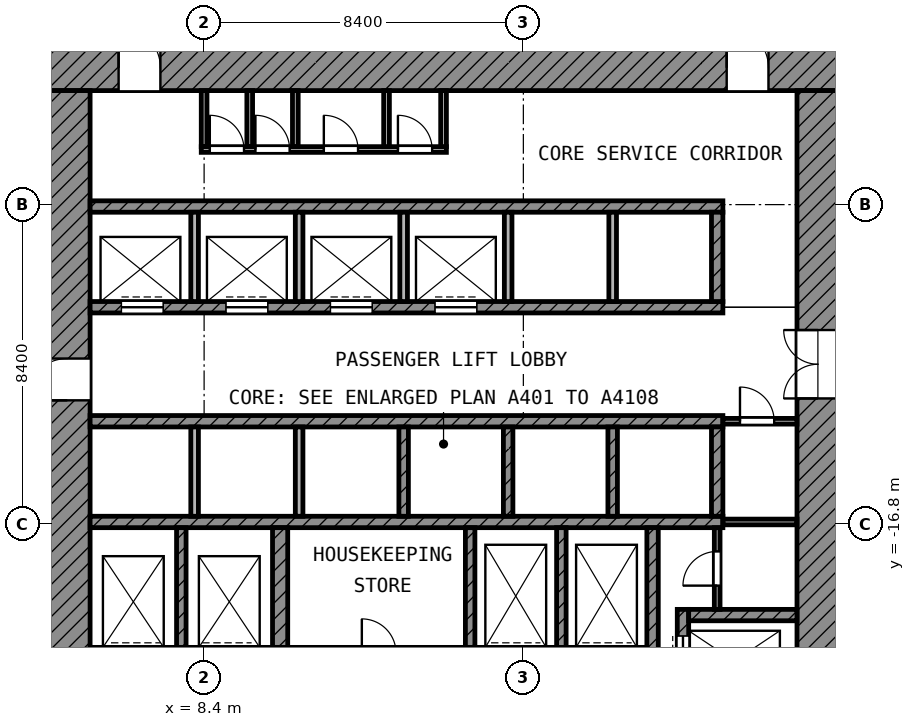
"""IFC4 building model, lengths in metres.
Left out: names, types, materials, properties, quantities, classifications, styles, units other than length and angle.
Written with IfcOpenShell. Run it as: python <this file> out.ifc"""

import sys

from ifc_helpers import new_model, si_unit, direction, frame, frame_2d, origin, place, context, subcontext, project, spatial, rectangle, extrude, element, fill, save


model = new_model("IFC4")
c1 = context("Model", 3, precision=1e-05, world=origin(), true_north=direction((0.0, 1.0)))
c2 = subcontext(c1, "Body", "Model", "MODEL_VIEW")
j1 = project(units=[si_unit("LENGTHUNIT", "METRE"), si_unit("PLANEANGLEUNIT", "RADIAN")], contexts=[c1])
p1 = place(None, origin())
s1 = spatial("IfcSite", under=j1, at=p1, CompositionType="ELEMENT")
p2 = place(p1, origin())
s2 = spatial("IfcBuilding", under=s1, at=p2, CompositionType="ELEMENT")
p3 = place(p2, frame((0.0, 0.0, 56.0)))
s3 = spatial("IfcBuildingStorey", under=s2, at=p3, CompositionType="ELEMENT", Elevation=56.0)
p4 = place(p3, frame((4.2, -4.8, 0.0), z_axis=(0.0, 0.0, 1.0), x_axis=(1.0, 0.0, 0.0)))
e1 = element("IfcWall", 1, at=p4, inside=s3, PredefinedType="SHEAR", context=c2, shape_type="SweptSolid", body=[
    extrude(rectangle(XDim=20.9, YDim=1.2, at=frame_2d((10.45, 0.0))), origin(), (0.0, 0.0, 1.0), 3.9),
])
p5 = place(p4, frame((1.95, 0.0, 0.0)))
e2 = element("IfcOpeningElement", 2, at=p5, cuts=e1, PredefinedType="OPENING", context=c2, shape_type="SweptSolid", body=[
    extrude(rectangle(XDim=1.1, YDim=2.1, at=frame_2d((0.55, 1.05))), frame((0.0, 0.61, 0.0), z_axis=(0.0, -1.0, 0.0), x_axis=(1.0, 0.0, 0.0)), (0.0, 0.0, 1.0), 1.22),
])
p6 = place(p4, frame((17.95, 0.0, 0.0)))
e3 = element("IfcOpeningElement", 3, at=p6, cuts=e1, PredefinedType="OPENING", context=c2, shape_type="SweptSolid", body=[
    extrude(rectangle(XDim=1.1, YDim=2.1, at=frame_2d((0.55, 1.05))), frame((0.0, 0.61, 0.0), z_axis=(0.0, -1.0, 0.0), x_axis=(1.0, 0.0, 0.0)), (0.0, 0.0, 1.0), 1.22),
])
p7 = place(p3, frame((4.8, -25.1, 0.0), z_axis=(0.0, 0.0, 1.0), x_axis=(0.0, 1.0, 0.0)))
e4 = element("IfcWall", 4, at=p7, inside=s3, PredefinedType="SHEAR", context=c2, shape_type="SweptSolid", body=[
    extrude(rectangle(XDim=19.7, YDim=1.2, at=frame_2d((9.85, 0.0))), origin(), (0.0, 0.0, 1.0), 3.9),
])
p8 = place(p7, frame((11.55, 0.0, 0.0)))
e5 = element("IfcOpeningElement", 5, at=p8, cuts=e4, PredefinedType="OPENING", context=c2, shape_type="SweptSolid", body=[
    extrude(rectangle(XDim=1.1, YDim=2.1, at=frame_2d((0.55, 1.05))), frame((0.0, 0.61, 0.0), z_axis=(0.0, -1.0, 0.0), x_axis=(1.0, 0.0, 0.0)), (0.0, 0.0, 1.0), 1.22),
])
p9 = place(p7, frame((2.25, 0.0, 0.0)))
e6 = element("IfcOpeningElement", 6, at=p9, cuts=e4, PredefinedType="OPENING", context=c2, shape_type="SweptSolid", body=[
    extrude(rectangle(XDim=1.1, YDim=2.1, at=frame_2d((0.55, 1.05))), frame((0.0, 0.61, 0.0), z_axis=(0.0, -1.0, 0.0), x_axis=(1.0, 0.0, 0.0)), (0.0, 0.0, 1.0), 1.22),
])
p10 = place(p3, frame((24.55, -24.0, 0.0), z_axis=(0.0, 0.0, 1.0), x_axis=(0.0, 1.0, 0.0)))
e7 = element("IfcWall", 7, at=p10, inside=s3, PredefinedType="SHEAR", context=c2, shape_type="SweptSolid", body=[
    extrude(rectangle(XDim=18.6, YDim=1.1, at=frame_2d((9.3, 0.0))), origin(), (0.0, 0.0, 1.0), 3.9),
])
p11 = place(p10, frame((10.5, 0.0, 0.0)))
e8 = element("IfcOpeningElement", 8, at=p11, cuts=e7, PredefinedType="OPENING", context=c2, shape_type="SweptSolid", body=[
    extrude(rectangle(XDim=1.8, YDim=2.1, at=frame_2d((0.9, 1.05))), frame((0.0, 0.56, 0.0), z_axis=(0.0, -1.0, 0.0), x_axis=(1.0, 0.0, 0.0)), (0.0, 0.0, 1.0), 1.12),
])
p12 = place(p3, frame((5.4, -8.45, 0.0), z_axis=(0.0, 0.0, 1.0), x_axis=(1.0, 0.0, 0.0)))
e9 = element("IfcWall", 9, at=p12, inside=s3, PredefinedType="SHEAR", context=c2, shape_type="SweptSolid", body=[
    extrude(rectangle(XDim=16.65, YDim=0.3, at=frame_2d((8.325, 0.0))), origin(), (0.0, 0.0, 1.0), 3.9),
])
p13 = place(p3, frame((5.4, -11.1, 0.0), z_axis=(0.0, 0.0, 1.0), x_axis=(1.0, 0.0, 0.0)))
e10 = element("IfcWall", 10, at=p13, inside=s3, PredefinedType="SHEAR", context=c2, shape_type="SweptSolid", body=[
    extrude(rectangle(XDim=16.65, YDim=0.3, at=frame_2d((8.325, 0.0))), origin(), (0.0, 0.0, 1.0), 3.9),
])
p14 = place(p13, frame((0.825, 0.0, 0.0)))
e11 = element("IfcOpeningElement", 11, at=p14, cuts=e10, PredefinedType="OPENING", context=c2, shape_type="SweptSolid", body=[
    extrude(rectangle(XDim=1.1, YDim=2.1, at=frame_2d((0.55, 1.05))), frame((0.0, 0.16, 0.0), z_axis=(0.0, -1.0, 0.0), x_axis=(1.0, 0.0, 0.0)), (0.0, 0.0, 1.0), 0.32),
])
p15 = place(p13, frame((3.575, 0.0, 0.0)))
e12 = element("IfcOpeningElement", 12, at=p15, cuts=e10, PredefinedType="OPENING", context=c2, shape_type="SweptSolid", body=[
    extrude(rectangle(XDim=1.1, YDim=2.1, at=frame_2d((0.55, 1.05))), frame((0.0, 0.16, 0.0), z_axis=(0.0, -1.0, 0.0), x_axis=(1.0, 0.0, 0.0)), (0.0, 0.0, 1.0), 0.32),
])
p16 = place(p13, frame((6.325, 0.0, 0.0)))
e13 = element("IfcOpeningElement", 13, at=p16, cuts=e10, PredefinedType="OPENING", context=c2, shape_type="SweptSolid", body=[
    extrude(rectangle(XDim=1.1, YDim=2.1, at=frame_2d((0.55, 1.05))), frame((0.0, 0.16, 0.0), z_axis=(0.0, -1.0, 0.0), x_axis=(1.0, 0.0, 0.0)), (0.0, 0.0, 1.0), 0.32),
])
p17 = place(p13, frame((9.075, 0.0, 0.0)))
e14 = element("IfcOpeningElement", 14, at=p17, cuts=e10, PredefinedType="OPENING", context=c2, shape_type="SweptSolid", body=[
    extrude(rectangle(XDim=1.1, YDim=2.1, at=frame_2d((0.55, 1.05))), frame((0.0, 0.16, 0.0), z_axis=(0.0, -1.0, 0.0), x_axis=(1.0, 0.0, 0.0)), (0.0, 0.0, 1.0), 0.32),
])
for number, where, z_axis, x_axis in (
    (15, (5.4, -14.1, 0.0), (0.0, 0.0, 1.0), (1.0, 0.0, 0.0)),
    (16, (5.4, -16.75, 0.0), (0.0, 0.0, 1.0), (1.0, 0.0, 0.0)),
):
    element("IfcWall", number, at=place(p3, frame(where, z_axis=z_axis, x_axis=x_axis)), inside=s3, PredefinedType="SHEAR", context=c2, shape_type="SweptSolid", body=[
        extrude(rectangle(XDim=16.65, YDim=0.3, at=frame_2d((8.325, 0.0))), origin(), (0.0, 0.0, 1.0), 3.9),
    ])
p18 = place(p3, frame((5.4, -20.2, 0.0), z_axis=(0.0, 0.0, 1.0), x_axis=(1.0, 0.0, 0.0)))
e17 = element("IfcWall", 17, at=p18, inside=s3, PredefinedType="SHEAR", context=c2, shape_type="SweptSolid", body=[
    extrude(rectangle(XDim=14.65, YDim=0.3, at=frame_2d((7.325, 0.0))), origin(), (0.0, 0.0, 1.0), 3.9),
])
p19 = place(p18, frame((10.55, 0.0, 0.0)))
e18 = element("IfcOpeningElement", 18, at=p19, cuts=e17, PredefinedType="OPENING", context=c2, shape_type="SweptSolid", body=[
    extrude(rectangle(XDim=1.3, YDim=2.1, at=frame_2d((0.65, 1.05))), frame((0.0, 0.16, 0.0), z_axis=(0.0, -1.0, 0.0), x_axis=(1.0, 0.0, 0.0)), (0.0, 0.0, 1.0), 0.32),
])
p20 = place(p18, frame((12.95, 0.0, 0.0)))
e19 = element("IfcOpeningElement", 19, at=p20, cuts=e17, PredefinedType="OPENING", context=c2, shape_type="SweptSolid", body=[
    extrude(rectangle(XDim=1.3, YDim=2.1, at=frame_2d((0.65, 1.05))), frame((0.0, 0.16, 0.0), z_axis=(0.0, -1.0, 0.0), x_axis=(1.0, 0.0, 0.0)), (0.0, 0.0, 1.0), 0.32),
])
p21 = place(p18, frame((0.55, 0.0, 0.0)))
e20 = element("IfcOpeningElement", 20, at=p21, cuts=e17, PredefinedType="OPENING", context=c2, shape_type="SweptSolid", body=[
    extrude(rectangle(XDim=1.3, YDim=2.1, at=frame_2d((0.65, 1.05))), frame((0.0, 0.16, 0.0), z_axis=(0.0, -1.0, 0.0), x_axis=(1.0, 0.0, 0.0)), (0.0, 0.0, 1.0), 0.32),
])
p22 = place(p18, frame((2.95, 0.0, 0.0)))
e21 = element("IfcOpeningElement", 21, at=p22, cuts=e17, PredefinedType="OPENING", context=c2, shape_type="SweptSolid", body=[
    extrude(rectangle(XDim=1.3, YDim=2.1, at=frame_2d((0.65, 1.05))), frame((0.0, 0.16, 0.0), z_axis=(0.0, -1.0, 0.0), x_axis=(1.0, 0.0, 0.0)), (0.0, 0.0, 1.0), 0.32),
])
p23 = place(p18, frame((7.15, 0.0, 0.0)))
e22 = element("IfcOpeningElement", 22, at=p23, cuts=e17, PredefinedType="OPENING", context=c2, shape_type="SweptSolid", body=[
    extrude(rectangle(XDim=0.9, YDim=2.1, at=frame_2d((0.45, 1.05))), frame((0.0, 0.16, 0.0), z_axis=(0.0, -1.0, 0.0), x_axis=(1.0, 0.0, 0.0)), (0.0, 0.0, 1.0), 0.32),
])
p24 = place(p3, frame((10.4, -20.05, 0.0), z_axis=(0.0, 0.0, 1.0), x_axis=(0.0, 1.0, 0.0)))
e23 = element("IfcWall", 23, at=p24, inside=s3, PredefinedType="SHEAR", context=c2, shape_type="SweptSolid", body=[
    extrude(rectangle(XDim=3.15, YDim=0.4, at=frame_2d((1.575, 0.0))), origin(), (0.0, 0.0, 1.0), 3.9),
])
p25 = place(p3, frame((20.2, -20.35, 0.0), z_axis=(0.0, 0.0, 1.0), x_axis=(0.0, 1.0, 0.0)))
e24 = element("IfcWall", 24, at=p25, inside=s3, PredefinedType="SHEAR", context=c2, shape_type="SweptSolid", body=[
    extrude(rectangle(XDim=3.45, YDim=0.3, at=frame_2d((1.725, 0.0))), origin(), (0.0, 0.0, 1.0), 3.9),
])
p26 = place(p3, frame((21.9, -10.95, 0.0), z_axis=(0.0, 0.0, 1.0), x_axis=(0.0, 1.0, 0.0)))
e25 = element("IfcWall", 25, at=p26, inside=s3, PredefinedType="SHEAR", context=c2, shape_type="SweptSolid", body=[
    extrude(rectangle(XDim=2.35, YDim=0.3, at=frame_2d((1.175, 0.0))), origin(), (0.0, 0.0, 1.0), 3.9),
])
p27 = place(p3, frame((21.9, -16.6, 0.0), z_axis=(0.0, 0.0, 1.0), x_axis=(0.0, 1.0, 0.0)))
e26 = element("IfcWall", 26, at=p27, inside=s3, PredefinedType="SHEAR", context=c2, shape_type="SweptSolid", body=[
    extrude(rectangle(XDim=2.35, YDim=0.3, at=frame_2d((1.175, 0.0))), origin(), (0.0, 0.0, 1.0), 3.9),
])
p28 = place(p3, frame((21.15, -19.2, 0.0), z_axis=(0.0, 0.0, 1.0), x_axis=(1.0, 0.0, 0.0)))
e27 = element("IfcWall", 27, at=p28, inside=s3, PredefinedType="SHEAR", context=c2, shape_type="SweptSolid", body=[
    extrude(rectangle(XDim=2.85, YDim=0.3, at=frame_2d((1.425, 0.0))), origin(), (0.0, 0.0, 1.0), 3.9),
])
p29 = place(p3, frame((21.0, -24.0, 0.0), z_axis=(0.0, 0.0, 1.0), x_axis=(0.0, 1.0, 0.0)))
e28 = element("IfcWall", 28, at=p29, inside=s3, PredefinedType="SHEAR", context=c2, shape_type="SweptSolid", body=[
    extrude(rectangle(XDim=4.95, YDim=0.3, at=frame_2d((2.475, 0.0))), origin(), (0.0, 0.0, 1.0), 3.9),
])
p30 = place(p29, frame((2.95, 0.0, 0.0)))
e29 = element("IfcOpeningElement", 29, at=p30, cuts=e28, PredefinedType="OPENING", context=c2, shape_type="SweptSolid", body=[
    extrude(rectangle(XDim=1.3, YDim=2.1, at=frame_2d((0.65, 1.05))), frame((0.0, 0.16, 0.0), z_axis=(0.0, -1.0, 0.0), x_axis=(1.0, 0.0, 0.0)), (0.0, 0.0, 1.0), 0.32),
])
p31 = place(p29, frame((0.55, 0.0, 0.0)))
e30 = element("IfcOpeningElement", 30, at=p31, cuts=e28, PredefinedType="OPENING", context=c2, shape_type="SweptSolid", body=[
    extrude(rectangle(XDim=1.3, YDim=2.1, at=frame_2d((0.65, 1.05))), frame((0.0, 0.16, 0.0), z_axis=(0.0, -1.0, 0.0), x_axis=(1.0, 0.0, 0.0)), (0.0, 0.0, 1.0), 0.32),
])
for number, where, z_axis, x_axis in (
    (31, (7.8, -20.05, 0.0), (0.0, 0.0, 1.0), (0.0, 1.0, 0.0)),
    (32, (15.4, -20.05, 0.0), (0.0, 0.0, 1.0), (0.0, 1.0, 0.0)),
    (33, (17.8, -20.05, 0.0), (0.0, 0.0, 1.0), (0.0, 1.0, 0.0)),
):
    element("IfcWall", number, at=place(p3, frame(where, z_axis=z_axis, x_axis=x_axis)), inside=s3, PredefinedType="SHEAR", context=c2, shape_type="SweptSolid", body=[
        extrude(rectangle(XDim=3.15, YDim=0.25, at=frame_2d((1.575, 0.0))), origin(), (0.0, 0.0, 1.0), 3.9),
    ])
for number, where, z_axis, x_axis in (
    (34, (8.15, -10.95, 0.0), (0.0, 0.0, 1.0), (0.0, 1.0, 0.0)),
    (35, (10.9, -10.95, 0.0), (0.0, 0.0, 1.0), (0.0, 1.0, 0.0)),
    (36, (13.65, -10.95, 0.0), (0.0, 0.0, 1.0), (0.0, 1.0, 0.0)),
    (37, (16.4, -10.95, 0.0), (0.0, 0.0, 1.0), (0.0, 1.0, 0.0)),
    (38, (19.15, -10.95, 0.0), (0.0, 0.0, 1.0), (0.0, 1.0, 0.0)),
):
    element("IfcWall", number, at=place(p3, frame(where, z_axis=z_axis, x_axis=x_axis)), inside=s3, PredefinedType="PARTITIONING", context=c2, shape_type="SweptSolid", body=[
        extrude(rectangle(XDim=2.35, YDim=0.2, at=frame_2d((1.175, 0.0))), origin(), (0.0, 0.0, 1.0), 3.9),
    ])
for number, where, z_axis, x_axis in (
    (39, (8.15, -16.6, 0.0), (0.0, 0.0, 1.0), (0.0, 1.0, 0.0)),
    (40, (10.9, -16.6, 0.0), (0.0, 0.0, 1.0), (0.0, 1.0, 0.0)),
):
    element("IfcWall", number, at=place(p3, frame(where, z_axis=z_axis, x_axis=x_axis)), inside=s3, PredefinedType="PARTITIONING", context=c2, shape_type="SweptSolid", body=[
        extrude(rectangle(XDim=2.35, YDim=0.2, at=frame_2d((1.175, 0.0))), origin(), (0.0, 0.0, 1.0), 3.9),
    ])
for number, where, z_axis, x_axis in (
    (41, (13.65, -16.6, 0.0), (0.0, 0.0, 1.0), (0.0, 1.0, 0.0)),
    (42, (16.4, -16.6, 0.0), (0.0, 0.0, 1.0), (0.0, 1.0, 0.0)),
    (43, (19.15, -16.6, 0.0), (0.0, 0.0, 1.0), (0.0, 1.0, 0.0)),
):
    element("IfcWall", number, at=place(p3, frame(where, z_axis=z_axis, x_axis=x_axis)), inside=s3, PredefinedType="SHEAR", context=c2, shape_type="SweptSolid", body=[
        extrude(rectangle(XDim=2.35, YDim=0.25, at=frame_2d((1.175, 0.0))), origin(), (0.0, 0.0, 1.0), 3.9),
    ])
p32 = place(p3, frame((21.9, -19.05, 0.0), z_axis=(0.0, 0.0, 1.0), x_axis=(0.0, 1.0, 0.0)))
e44 = element("IfcWall", 44, at=p32, inside=s3, PredefinedType="PARTITIONING", context=c2, shape_type="SweptSolid", body=[
    extrude(rectangle(XDim=2.15, YDim=0.15, at=frame_2d((1.075, 0.0))), origin(), (0.0, 0.0, 1.0), 3.9),
])
p33 = place(p32, frame((0.625, 0.0, 0.0)))
e45 = element("IfcOpeningElement", 45, at=p33, cuts=e44, PredefinedType="OPENING", context=c2, shape_type="SweptSolid", body=[
    extrude(rectangle(XDim=0.9, YDim=2.1, at=frame_2d((0.45, 1.05))), frame((0.0, 0.085, 0.0), z_axis=(0.0, -1.0, 0.0), x_axis=(1.0, 0.0, 0.0)), (0.0, 0.0, 1.0), 0.17),
])
p34 = place(p3, frame((22.05, -16.75, 0.0), z_axis=(0.0, 0.0, 1.0), x_axis=(1.0, 0.0, 0.0)))
e46 = element("IfcWall", 46, at=p34, inside=s3, PredefinedType="PARTITIONING", context=c2, shape_type="SweptSolid", body=[
    extrude(rectangle(XDim=1.95, YDim=0.15, at=frame_2d((0.975, 0.0))), origin(), (0.0, 0.0, 1.0), 3.9),
])
p35 = place(p3, frame((22.05, -14.1, 0.0), z_axis=(0.0, 0.0, 1.0), x_axis=(1.0, 0.0, 0.0)))
e47 = element("IfcWall", 47, at=p35, inside=s3, PredefinedType="PARTITIONING", context=c2, shape_type="SweptSolid", body=[
    extrude(rectangle(XDim=1.95, YDim=0.15, at=frame_2d((0.975, 0.0))), origin(), (0.0, 0.0, 1.0), 3.9),
])
p36 = place(p35, frame((0.45, 0.0, 0.0)))
e48 = element("IfcOpeningElement", 48, at=p36, cuts=e47, PredefinedType="OPENING", context=c2, shape_type="SweptSolid", body=[
    extrude(rectangle(XDim=0.9, YDim=2.1, at=frame_2d((0.45, 1.05))), frame((0.0, 0.085, 0.0), z_axis=(0.0, -1.0, 0.0), x_axis=(1.0, 0.0, 0.0)), (0.0, 0.0, 1.0), 0.17),
])
p37 = place(p3, frame((8.325, -6.95, 0.0), z_axis=(0.0, 0.0, 1.0), x_axis=(1.0, 0.0, 0.0)))
e49 = element("IfcWall", 49, at=p37, inside=s3, PredefinedType="PARTITIONING", context=c2, shape_type="SweptSolid", body=[
    extrude(rectangle(XDim=6.45, YDim=0.15, at=frame_2d((3.225, 0.0))), origin(), (0.0, 0.0, 1.0), 3.9),
])
p38 = place(p37, frame((0.225, 0.0, 0.0)))
e50 = element("IfcOpeningElement", 50, at=p38, cuts=e49, PredefinedType="OPENING", context=c2, shape_type="SweptSolid", body=[
    extrude(rectangle(XDim=0.9, YDim=2.1, at=frame_2d((0.45, 1.05))), frame((0.0, 0.085, 0.0), z_axis=(0.0, -1.0, 0.0), x_axis=(1.0, 0.0, 0.0)), (0.0, 0.0, 1.0), 0.17),
])
p39 = place(p37, frame((1.425, 0.0, 0.0)))
e51 = element("IfcOpeningElement", 51, at=p39, cuts=e49, PredefinedType="OPENING", context=c2, shape_type="SweptSolid", body=[
    extrude(rectangle(XDim=0.9, YDim=2.1, at=frame_2d((0.45, 1.05))), frame((0.0, 0.085, 0.0), z_axis=(0.0, -1.0, 0.0), x_axis=(1.0, 0.0, 0.0)), (0.0, 0.0, 1.0), 0.17),
])
p40 = place(p37, frame((3.225, 0.0, 0.0)))
e52 = element("IfcOpeningElement", 52, at=p40, cuts=e49, PredefinedType="OPENING", context=c2, shape_type="SweptSolid", body=[
    extrude(rectangle(XDim=0.9, YDim=2.1, at=frame_2d((0.45, 1.05))), frame((0.0, 0.085, 0.0), z_axis=(0.0, -1.0, 0.0), x_axis=(1.0, 0.0, 0.0)), (0.0, 0.0, 1.0), 0.17),
])
p41 = place(p37, frame((5.175, 0.0, 0.0)))
e53 = element("IfcOpeningElement", 53, at=p41, cuts=e49, PredefinedType="OPENING", context=c2, shape_type="SweptSolid", body=[
    extrude(rectangle(XDim=0.9, YDim=2.1, at=frame_2d((0.45, 1.05))), frame((0.0, 0.085, 0.0), z_axis=(0.0, -1.0, 0.0), x_axis=(1.0, 0.0, 0.0)), (0.0, 0.0, 1.0), 0.17),
])
for number, where, z_axis, x_axis in (
    (54, (8.4, -6.875, 0.0), (0.0, 0.0, 1.0), (0.0, 1.0, 0.0)),
    (55, (9.6, -6.875, 0.0), (0.0, 0.0, 1.0), (0.0, 1.0, 0.0)),
    (56, (10.8, -6.875, 0.0), (0.0, 0.0, 1.0), (0.0, 1.0, 0.0)),
    (57, (13.2, -6.875, 0.0), (0.0, 0.0, 1.0), (0.0, 1.0, 0.0)),
    (58, (14.7, -6.875, 0.0), (0.0, 0.0, 1.0), (0.0, 1.0, 0.0)),
):
    element("IfcWall", number, at=place(p3, frame(where, z_axis=z_axis, x_axis=x_axis)), inside=s3, PredefinedType="PARTITIONING", context=c2, shape_type="SweptSolid", body=[
        extrude(rectangle(XDim=1.475, YDim=0.15, at=frame_2d((0.738, 0.0))), origin(), (0.0, 0.0, 1.0), 3.9),
    ])
p42 = place(p14, origin())
e59 = element("IfcDoor", 59, at=p42, inside=s3, OperationType="DOUBLE_DOOR_SLIDING", PredefinedType="DOOR", context=c2, shape_type="SweptSolid", body=[
    extrude(rectangle(XDim=1.1, YDim=2.1, at=frame_2d((0.55, 1.05))), frame((0.0, 0.025, 0.0), z_axis=(0.0, -1.0, 0.0), x_axis=(1.0, 0.0, 0.0)), (0.0, 0.0, 1.0), 0.05),
])
fill(e11, e59)
p43 = place(p15, origin())
e60 = element("IfcDoor", 60, at=p43, inside=s3, OperationType="DOUBLE_DOOR_SLIDING", PredefinedType="DOOR", context=c2, shape_type="SweptSolid", body=[
    extrude(rectangle(XDim=1.1, YDim=2.1, at=frame_2d((0.55, 1.05))), frame((0.0, 0.025, 0.0), z_axis=(0.0, -1.0, 0.0), x_axis=(1.0, 0.0, 0.0)), (0.0, 0.0, 1.0), 0.05),
])
fill(e12, e60)
p44 = place(p16, origin())
e61 = element("IfcDoor", 61, at=p44, inside=s3, OperationType="DOUBLE_DOOR_SLIDING", PredefinedType="DOOR", context=c2, shape_type="SweptSolid", body=[
    extrude(rectangle(XDim=1.1, YDim=2.1, at=frame_2d((0.55, 1.05))), frame((0.0, 0.025, 0.0), z_axis=(0.0, -1.0, 0.0), x_axis=(1.0, 0.0, 0.0)), (0.0, 0.0, 1.0), 0.05),
])
fill(e13, e61)
p45 = place(p17, origin())
e62 = element("IfcDoor", 62, at=p45, inside=s3, OperationType="DOUBLE_DOOR_SLIDING", PredefinedType="DOOR", context=c2, shape_type="SweptSolid", body=[
    extrude(rectangle(XDim=1.1, YDim=2.1, at=frame_2d((0.55, 1.05))), frame((0.0, 0.025, 0.0), z_axis=(0.0, -1.0, 0.0), x_axis=(1.0, 0.0, 0.0)), (0.0, 0.0, 1.0), 0.05),
])
fill(e14, e62)
p46 = place(p30, origin())
e63 = element("IfcDoor", 63, at=p46, inside=s3, OperationType="DOUBLE_DOOR_SLIDING", PredefinedType="DOOR", context=c2, shape_type="SweptSolid", body=[
    extrude(rectangle(XDim=1.3, YDim=2.1, at=frame_2d((0.65, 1.05))), frame((0.0, 0.025, 0.0), z_axis=(0.0, -1.0, 0.0), x_axis=(1.0, 0.0, 0.0)), (0.0, 0.0, 1.0), 0.05),
])
fill(e29, e63)
p47 = place(p8, origin())
e64 = element("IfcDoor", 64, at=p47, inside=s3, OperationType="SINGLE_SWING_LEFT", PredefinedType="DOOR", context=c2, shape_type="SweptSolid", body=[
    extrude(rectangle(XDim=1.1, YDim=2.1, at=frame_2d((0.55, 1.05))), frame((0.0, 0.025, 0.0), z_axis=(0.0, -1.0, 0.0), x_axis=(1.0, 0.0, 0.0)), (0.0, 0.0, 1.0), 0.05),
])
fill(e5, e64)
p48 = place(p5, origin())
e65 = element("IfcDoor", 65, at=p48, inside=s3, OperationType="SINGLE_SWING_LEFT", PredefinedType="DOOR", context=c2, shape_type="SweptSolid", body=[
    extrude(rectangle(XDim=1.1, YDim=2.1, at=frame_2d((0.55, 1.05))), frame((0.0, 0.025, 0.0), z_axis=(0.0, -1.0, 0.0), x_axis=(1.0, 0.0, 0.0)), (0.0, 0.0, 1.0), 0.05),
])
fill(e2, e65)
p49 = place(p6, origin())
e66 = element("IfcDoor", 66, at=p49, inside=s3, OperationType="SINGLE_SWING_LEFT", PredefinedType="DOOR", context=c2, shape_type="SweptSolid", body=[
    extrude(rectangle(XDim=1.1, YDim=2.1, at=frame_2d((0.55, 1.05))), frame((0.0, 0.025, 0.0), z_axis=(0.0, -1.0, 0.0), x_axis=(1.0, 0.0, 0.0)), (0.0, 0.0, 1.0), 0.05),
])
fill(e3, e66)
p50 = place(p11, origin())
e67 = element("IfcDoor", 67, at=p50, inside=s3, OperationType="DOUBLE_DOOR_SINGLE_SWING", PredefinedType="DOOR", context=c2, shape_type="SweptSolid", body=[
    extrude(rectangle(XDim=1.8, YDim=2.1, at=frame_2d((0.9, 1.05))), frame((0.0, 0.025, 0.0), z_axis=(0.0, -1.0, 0.0), x_axis=(1.0, 0.0, 0.0)), (0.0, 0.0, 1.0), 0.05),
])
fill(e8, e67)
p51 = place(p38, origin())
e68 = element("IfcDoor", 68, at=p51, inside=s3, OperationType="SINGLE_SWING_LEFT", PredefinedType="DOOR", context=c2, shape_type="SweptSolid", body=[
    extrude(rectangle(XDim=0.9, YDim=2.1, at=frame_2d((0.45, 1.05))), frame((0.0, 0.025, 0.0), z_axis=(0.0, -1.0, 0.0), x_axis=(1.0, 0.0, 0.0)), (0.0, 0.0, 1.0), 0.05),
])
fill(e50, e68)
p52 = place(p39, origin())
e69 = element("IfcDoor", 69, at=p52, inside=s3, OperationType="SINGLE_SWING_LEFT", PredefinedType="DOOR", context=c2, shape_type="SweptSolid", body=[
    extrude(rectangle(XDim=0.9, YDim=2.1, at=frame_2d((0.45, 1.05))), frame((0.0, 0.025, 0.0), z_axis=(0.0, -1.0, 0.0), x_axis=(1.0, 0.0, 0.0)), (0.0, 0.0, 1.0), 0.05),
])
fill(e51, e69)
p53 = place(p40, origin())
e70 = element("IfcDoor", 70, at=p53, inside=s3, OperationType="SINGLE_SWING_LEFT", PredefinedType="DOOR", context=c2, shape_type="SweptSolid", body=[
    extrude(rectangle(XDim=0.9, YDim=2.1, at=frame_2d((0.45, 1.05))), frame((0.0, 0.025, 0.0), z_axis=(0.0, -1.0, 0.0), x_axis=(1.0, 0.0, 0.0)), (0.0, 0.0, 1.0), 0.05),
])
fill(e52, e70)
p54 = place(p41, origin())
e71 = element("IfcDoor", 71, at=p54, inside=s3, OperationType="SINGLE_SWING_LEFT", PredefinedType="DOOR", context=c2, shape_type="SweptSolid", body=[
    extrude(rectangle(XDim=0.9, YDim=2.1, at=frame_2d((0.45, 1.05))), frame((0.0, 0.025, 0.0), z_axis=(0.0, -1.0, 0.0), x_axis=(1.0, 0.0, 0.0)), (0.0, 0.0, 1.0), 0.05),
])
fill(e53, e71)
p55 = place(p36, origin())
e72 = element("IfcDoor", 72, at=p55, inside=s3, OperationType="SINGLE_SWING_LEFT", PredefinedType="DOOR", context=c2, shape_type="SweptSolid", body=[
    extrude(rectangle(XDim=0.9, YDim=2.1, at=frame_2d((0.45, 1.05))), frame((0.0, 0.025, 0.0), z_axis=(0.0, -1.0, 0.0), x_axis=(1.0, 0.0, 0.0)), (0.0, 0.0, 1.0), 0.05),
])
fill(e48, e72)
p56 = place(p33, origin())
e73 = element("IfcDoor", 73, at=p56, inside=s3, OperationType="SINGLE_SWING_LEFT", PredefinedType="DOOR", context=c2, shape_type="SweptSolid", body=[
    extrude(rectangle(XDim=0.9, YDim=2.1, at=frame_2d((0.45, 1.05))), frame((0.0, 0.025, 0.0), z_axis=(0.0, -1.0, 0.0), x_axis=(1.0, 0.0, 0.0)), (0.0, 0.0, 1.0), 0.05),
])
fill(e45, e73)
save(model, sys.argv[1])
